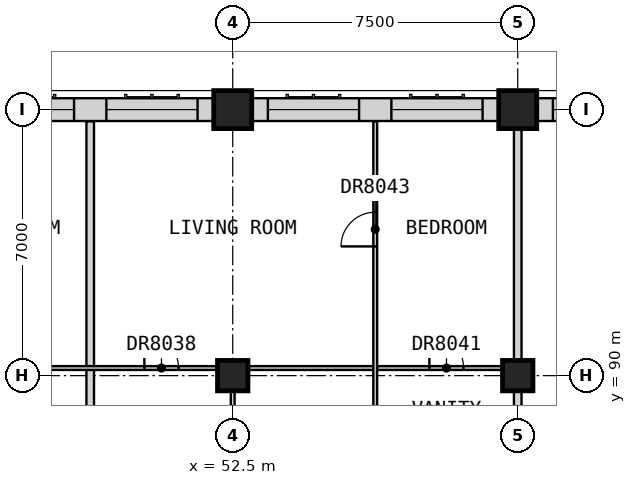
"""IFC4 building model, lengths in metres.
Left out: names, types, materials, properties, quantities, classifications, styles, units other than length and angle.
Written with IfcOpenShell. Run it as: python <this file> out.ifc"""

import sys

from ifc_helpers import new_model, si_unit, direction, frame, frame_2d, origin, origin_2d, place, context, subcontext, project, spatial, rectangle, extrude, element, fill, save


model = new_model("IFC4")
c1 = context("Model", 3, precision=1e-05, world=origin(), true_north=direction((0.0, 1.0)))
c2 = subcontext(c1, "Body", "Model", "MODEL_VIEW")
j1 = project(units=[si_unit("LENGTHUNIT", "METRE"), si_unit("PLANEANGLEUNIT", "RADIAN")], contexts=[c1])
p1 = place(None, origin())
s1 = spatial("IfcSite", under=j1, at=p1, CompositionType="ELEMENT")
p2 = place(p1, origin())
s2 = spatial("IfcBuilding", under=s1, at=p2, CompositionType="ELEMENT")
p3 = place(p2, frame((0.0, 0.0, 233.7)))
s3 = spatial("IfcBuildingStorey", under=s2, at=p3, CompositionType="ELEMENT", Elevation=233.7)
p4 = place(p3, frame((52.5, 90.0, 0.0), z_axis=(0.0, 0.0, 1.0), x_axis=(1.0, 0.0, 0.0)))
e1 = element("IfcColumn", 1, at=p4, inside=s3, PredefinedType="COLUMN", context=c2, shape_type="SweptSolid", body=[
    extrude(rectangle(XDim=0.8, YDim=0.8, at=origin_2d()), origin(), (0.0, 0.0, 1.0), 3.5),
])
p5 = place(p3, frame((52.5, 97.0, 0.0), z_axis=(0.0, 0.0, 1.0), x_axis=(1.0, 0.0, 0.0)))
e2 = element("IfcColumn", 2, at=p5, inside=s3, PredefinedType="COLUMN", context=c2, shape_type="SweptSolid", body=[
    extrude(rectangle(XDim=1.0, YDim=1.0, at=origin_2d()), origin(), (0.0, 0.0, 1.0), 3.5),
])
p6 = place(p3, frame((60.0, 90.0, 0.0), z_axis=(0.0, 0.0, 1.0), x_axis=(1.0, 0.0, 0.0)))
e3 = element("IfcColumn", 3, at=p6, inside=s3, PredefinedType="COLUMN", context=c2, shape_type="SweptSolid", body=[
    extrude(rectangle(XDim=0.8, YDim=0.8, at=origin_2d()), origin(), (0.0, 0.0, 1.0), 3.5),
])
p7 = place(p3, frame((60.0, 97.0, 0.0), z_axis=(0.0, 0.0, 1.0), x_axis=(1.0, 0.0, 0.0)))
e4 = element("IfcColumn", 4, at=p7, inside=s3, PredefinedType="COLUMN", context=c2, shape_type="SweptSolid", body=[
    extrude(rectangle(XDim=1.0, YDim=1.0, at=origin_2d()), origin(), (0.0, 0.0, 1.0), 3.5),
])
p8 = place(p3, frame((67.0, 97.0, 0.0), z_axis=(0.0, 0.0, 1.0), x_axis=(-1.0, 0.0, 0.0)))
e5 = element("IfcWall", 5, at=p8, inside=s3, PredefinedType="SOLIDWALL", context=c2, shape_type="SweptSolid", body=[
    extrude(rectangle(XDim=6.5, YDim=0.6, at=frame_2d((3.25, 0.0))), origin(), (0.0, 0.0, 1.0), 2.75),
])
p9 = place(p8, frame((3.675, 0.0, 0.8)))
e6 = element("IfcOpeningElement", 6, at=p9, cuts=e5, PredefinedType="OPENING", context=c2, shape_type="SweptSolid", body=[
    extrude(rectangle(XDim=2.4, YDim=1.8, at=frame_2d((1.2, 0.9))), frame((0.0, 0.31, 0.0), z_axis=(0.0, -1.0, 0.0), x_axis=(1.0, 0.0, 0.0)), (0.0, 0.0, 1.0), 0.62),
])
p10 = place(p8, frame((0.425, 0.0, 0.8)))
e7 = element("IfcOpeningElement", 7, at=p10, cuts=e5, PredefinedType="OPENING", context=c2, shape_type="SweptSolid", body=[
    extrude(rectangle(XDim=2.4, YDim=1.8, at=frame_2d((1.2, 0.9))), frame((0.0, 0.31, 0.0), z_axis=(0.0, -1.0, 0.0), x_axis=(1.0, 0.0, 0.0)), (0.0, 0.0, 1.0), 0.62),
])
p11 = place(p3, frame((59.5, 97.0, 0.0), z_axis=(0.0, 0.0, 1.0), x_axis=(-1.0, 0.0, 0.0)))
e8 = element("IfcWall", 8, at=p11, inside=s3, PredefinedType="SOLIDWALL", context=c2, shape_type="SweptSolid", body=[
    extrude(rectangle(XDim=6.5, YDim=0.6, at=frame_2d((3.25, 0.0))), origin(), (0.0, 0.0, 1.0), 2.75),
])
p12 = place(p11, frame((3.675, 0.0, 0.8)))
e9 = element("IfcOpeningElement", 9, at=p12, cuts=e8, PredefinedType="OPENING", context=c2, shape_type="SweptSolid", body=[
    extrude(rectangle(XDim=2.4, YDim=1.8, at=frame_2d((1.2, 0.9))), frame((0.0, 0.31, 0.0), z_axis=(0.0, -1.0, 0.0), x_axis=(1.0, 0.0, 0.0)), (0.0, 0.0, 1.0), 0.62),
])
p13 = place(p11, frame((0.425, 0.0, 0.8)))
e10 = element("IfcOpeningElement", 10, at=p13, cuts=e8, PredefinedType="OPENING", context=c2, shape_type="SweptSolid", body=[
    extrude(rectangle(XDim=2.4, YDim=1.8, at=frame_2d((1.2, 0.9))), frame((0.0, 0.31, 0.0), z_axis=(0.0, -1.0, 0.0), x_axis=(1.0, 0.0, 0.0)), (0.0, 0.0, 1.0), 0.62),
])
p14 = place(p3, frame((52.0, 97.0, 0.0), z_axis=(0.0, 0.0, 1.0), x_axis=(-1.0, 0.0, 0.0)))
e11 = element("IfcWall", 11, at=p14, inside=s3, PredefinedType="SOLIDWALL", context=c2, shape_type="SweptSolid", body=[
    extrude(rectangle(XDim=6.5, YDim=0.6, at=frame_2d((3.25, 0.0))), origin(), (0.0, 0.0, 1.0), 2.75),
])
p15 = place(p14, frame((3.675, 0.0, 0.8)))
e12 = element("IfcOpeningElement", 12, at=p15, cuts=e11, PredefinedType="OPENING", context=c2, shape_type="SweptSolid", body=[
    extrude(rectangle(XDim=2.4, YDim=1.8, at=frame_2d((1.2, 0.9))), frame((0.0, 0.31, 0.0), z_axis=(0.0, -1.0, 0.0), x_axis=(1.0, 0.0, 0.0)), (0.0, 0.0, 1.0), 0.62),
])
p16 = place(p14, frame((0.425, 0.0, 0.8)))
e13 = element("IfcOpeningElement", 13, at=p16, cuts=e11, PredefinedType="OPENING", context=c2, shape_type="SweptSolid", body=[
    extrude(rectangle(XDim=2.4, YDim=1.8, at=frame_2d((1.2, 0.9))), frame((0.0, 0.31, 0.0), z_axis=(0.0, -1.0, 0.0), x_axis=(1.0, 0.0, 0.0)), (0.0, 0.0, 1.0), 0.62),
])
p17 = place(p3, frame((48.75, 84.375, 0.0), z_axis=(0.0, 0.0, 1.0), x_axis=(0.0, 1.0, 0.0)))
e14 = element("IfcWall", 14, at=p17, inside=s3, PredefinedType="PARTITIONING", context=c2, shape_type="SweptSolid", body=[
    extrude(rectangle(XDim=12.315, YDim=0.2, at=frame_2d((6.157, 0.0))), origin(), (0.0, 0.0, 1.0), 3.25),
])
p18 = place(p3, frame((60.0, 84.375, 0.0), z_axis=(0.0, 0.0, 1.0), x_axis=(0.0, 1.0, 0.0)))
e15 = element("IfcWall", 15, at=p18, inside=s3, PredefinedType="PARTITIONING", context=c2, shape_type="SweptSolid", body=[
    extrude(rectangle(XDim=13.125, YDim=0.2, at=frame_2d((6.562, 0.0))), origin(), (0.0, 0.0, 1.0), 3.25),
])
p19 = place(p3, frame((33.85, 90.2, 0.0), z_axis=(0.0, 0.0, 1.0), x_axis=(1.0, 0.0, 0.0)))
e16 = element("IfcWall", 16, at=p19, inside=s3, PredefinedType="PARTITIONING", context=c2, shape_type="SweptSolid", body=[
    extrude(rectangle(XDim=26.05, YDim=0.1, at=frame_2d((13.025, 0.0))), origin(), (0.0, 0.0, 1.0), 3.25),
])
p20 = place(p19, frame((0.175, 0.0, 0.0)))
e17 = element("IfcOpeningElement", 17, at=p20, cuts=e16, PredefinedType="OPENING", context=c2, shape_type="SweptSolid", body=[
    extrude(rectangle(XDim=0.9, YDim=2.1, at=frame_2d((0.45, 1.05))), frame((0.0, 0.06, 0.0), z_axis=(0.0, -1.0, 0.0), x_axis=(1.0, 0.0, 0.0)), (0.0, 0.0, 1.0), 0.12),
])
p21 = place(p19, frame((8.825, 0.0, 0.0)))
e18 = element("IfcOpeningElement", 18, at=p21, cuts=e16, PredefinedType="OPENING", context=c2, shape_type="SweptSolid", body=[
    extrude(rectangle(XDim=0.9, YDim=2.1, at=frame_2d((0.45, 1.05))), frame((0.0, 0.06, 0.0), z_axis=(0.0, -1.0, 0.0), x_axis=(1.0, 0.0, 0.0)), (0.0, 0.0, 1.0), 0.12),
])
p22 = place(p19, frame((16.325, 0.0, 0.0)))
e19 = element("IfcOpeningElement", 19, at=p22, cuts=e16, PredefinedType="OPENING", context=c2, shape_type="SweptSolid", body=[
    extrude(rectangle(XDim=0.9, YDim=2.1, at=frame_2d((0.45, 1.05))), frame((0.0, 0.06, 0.0), z_axis=(0.0, -1.0, 0.0), x_axis=(1.0, 0.0, 0.0)), (0.0, 0.0, 1.0), 0.12),
])
p23 = place(p19, frame((23.825, 0.0, 0.0)))
e20 = element("IfcOpeningElement", 20, at=p23, cuts=e16, PredefinedType="OPENING", context=c2, shape_type="SweptSolid", body=[
    extrude(rectangle(XDim=0.9, YDim=2.1, at=frame_2d((0.45, 1.05))), frame((0.0, 0.06, 0.0), z_axis=(0.0, -1.0, 0.0), x_axis=(1.0, 0.0, 0.0)), (0.0, 0.0, 1.0), 0.12),
])
p24 = place(p3, frame((52.5, 87.312, 0.0), z_axis=(0.0, 0.0, 1.0), x_axis=(0.0, 1.0, 0.0)))
e21 = element("IfcWall", 21, at=p24, inside=s3, PredefinedType="PARTITIONING", context=c2, shape_type="SweptSolid", body=[
    extrude(rectangle(XDim=2.837, YDim=0.1, at=frame_2d((1.419, 0.0))), origin(), (0.0, 0.0, 1.0), 3.25),
])
p25 = place(p24, frame((0.962, 0.0, 0.0)))
e22 = element("IfcOpeningElement", 22, at=p25, cuts=e21, PredefinedType="OPENING", context=c2, shape_type="SweptSolid", body=[
    extrude(rectangle(XDim=0.9, YDim=2.1, at=frame_2d((0.45, 1.05))), frame((0.0, 0.06, 0.0), z_axis=(0.0, -1.0, 0.0), x_axis=(1.0, 0.0, 0.0)), (0.0, 0.0, 1.0), 0.12),
])
p26 = place(p3, frame((56.25, 87.312, 0.0), z_axis=(0.0, 0.0, 1.0), x_axis=(0.0, 1.0, 0.0)))
e23 = element("IfcWall", 23, at=p26, inside=s3, PredefinedType="PARTITIONING", context=c2, shape_type="SweptSolid", body=[
    extrude(rectangle(XDim=9.377, YDim=0.1, at=frame_2d((4.689, 0.0))), origin(), (0.0, 0.0, 1.0), 3.25),
])
p27 = place(p26, frame((6.087, 0.0, 0.0)))
e24 = element("IfcOpeningElement", 24, at=p27, cuts=e23, PredefinedType="OPENING", context=c2, shape_type="SweptSolid", body=[
    extrude(rectangle(XDim=0.9, YDim=2.1, at=frame_2d((0.45, 1.05))), frame((0.0, 0.06, 0.0), z_axis=(0.0, -1.0, 0.0), x_axis=(1.0, 0.0, 0.0)), (0.0, 0.0, 1.0), 0.12),
])
p28 = place(p9, origin())
e25 = element("IfcWindow", 25, at=p28, inside=s3, PartitioningType="SINGLE_PANEL", PredefinedType="WINDOW", context=c2, shape_type="SweptSolid", body=[
    extrude(rectangle(XDim=2.4, YDim=1.8, at=frame_2d((1.2, 0.9))), frame((0.0, -0.07, 0.0), z_axis=(0.0, -1.0, 0.0), x_axis=(1.0, 0.0, 0.0)), (0.0, 0.0, 1.0), 0.06),
])
fill(e6, e25)
p29 = place(p12, origin())
e26 = element("IfcWindow", 26, at=p29, inside=s3, PartitioningType="SINGLE_PANEL", PredefinedType="WINDOW", context=c2, shape_type="SweptSolid", body=[
    extrude(rectangle(XDim=2.4, YDim=1.8, at=frame_2d((1.2, 0.9))), frame((0.0, -0.07, 0.0), z_axis=(0.0, -1.0, 0.0), x_axis=(1.0, 0.0, 0.0)), (0.0, 0.0, 1.0), 0.06),
])
fill(e9, e26)
p30 = place(p13, origin())
e27 = element("IfcWindow", 27, at=p30, inside=s3, PartitioningType="SINGLE_PANEL", PredefinedType="WINDOW", context=c2, shape_type="SweptSolid", body=[
    extrude(rectangle(XDim=2.4, YDim=1.8, at=frame_2d((1.2, 0.9))), frame((0.0, -0.07, 0.0), z_axis=(0.0, -1.0, 0.0), x_axis=(1.0, 0.0, 0.0)), (0.0, 0.0, 1.0), 0.06),
])
fill(e10, e27)
p31 = place(p15, origin())
e28 = element("IfcWindow", 28, at=p31, inside=s3, PartitioningType="SINGLE_PANEL", PredefinedType="WINDOW", context=c2, shape_type="SweptSolid", body=[
    extrude(rectangle(XDim=2.4, YDim=1.8, at=frame_2d((1.2, 0.9))), frame((0.0, -0.07, 0.0), z_axis=(0.0, -1.0, 0.0), x_axis=(1.0, 0.0, 0.0)), (0.0, 0.0, 1.0), 0.06),
])
fill(e12, e28)
p32 = place(p16, origin())
e29 = element("IfcWindow", 29, at=p32, inside=s3, PartitioningType="SINGLE_PANEL", PredefinedType="WINDOW", context=c2, shape_type="SweptSolid", body=[
    extrude(rectangle(XDim=2.4, YDim=1.8, at=frame_2d((1.2, 0.9))), frame((0.0, -0.07, 0.0), z_axis=(0.0, -1.0, 0.0), x_axis=(1.0, 0.0, 0.0)), (0.0, 0.0, 1.0), 0.06),
])
fill(e13, e29)
p33 = place(p22, origin())
e30 = element("IfcDoor", 30, at=p33, inside=s3, OperationType="SINGLE_SWING_RIGHT", PredefinedType="DOOR", context=c2, shape_type="SweptSolid", body=[
    extrude(rectangle(XDim=0.9, YDim=2.1, at=frame_2d((0.45, 1.05))), frame((0.0, 0.025, 0.0), z_axis=(0.0, -1.0, 0.0), x_axis=(1.0, 0.0, 0.0)), (0.0, 0.0, 1.0), 0.05),
])
fill(e19, e30)
p34 = place(p23, origin())
e31 = element("IfcDoor", 31, at=p34, inside=s3, OperationType="SINGLE_SWING_RIGHT", PredefinedType="DOOR", context=c2, shape_type="SweptSolid", body=[
    extrude(rectangle(XDim=0.9, YDim=2.1, at=frame_2d((0.45, 1.05))), frame((0.0, 0.025, 0.0), z_axis=(0.0, -1.0, 0.0), x_axis=(1.0, 0.0, 0.0)), (0.0, 0.0, 1.0), 0.05),
])
fill(e20, e31)
p35 = place(p27, origin())
e32 = element("IfcDoor", 32, at=p35, inside=s3, OperationType="SINGLE_SWING_LEFT", PredefinedType="DOOR", context=c2, shape_type="SweptSolid", body=[
    extrude(rectangle(XDim=0.9, YDim=2.1, at=frame_2d((0.45, 1.05))), frame((0.0, 0.025, 0.0), z_axis=(0.0, -1.0, 0.0), x_axis=(1.0, 0.0, 0.0)), (0.0, 0.0, 1.0), 0.05),
])
fill(e24, e32)
save(model, sys.argv[1])
